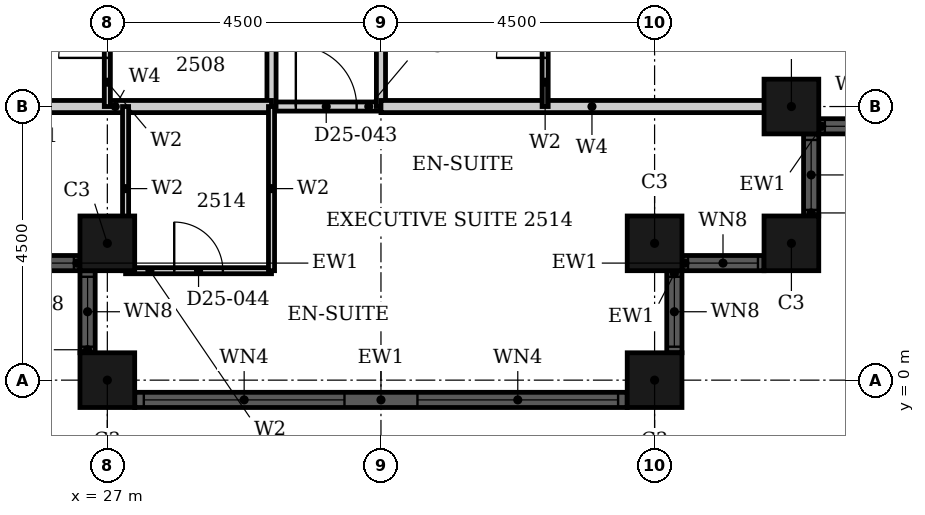
"""IFC4 building model, lengths in metres.
Left out: names, types, materials, properties, quantities, classifications, styles, units other than length and angle.
Written with IfcOpenShell. Run it as: python <this file> out.ifc"""

import sys

from ifc_helpers import new_model, si_unit, direction, frame, frame_2d, origin, origin_2d, place, context, subcontext, project, spatial, rectangle, hollow_rectangle, extrude, element, fill, save


model = new_model("IFC4")
c1 = context("Model", 3, precision=1e-05, world=origin(), true_north=direction((0.0, 1.0)))
c2 = subcontext(c1, "Body", "Model", "MODEL_VIEW")
j1 = project(units=[si_unit("LENGTHUNIT", "METRE"), si_unit("PLANEANGLEUNIT", "RADIAN")], contexts=[c1])
p1 = place(None, origin())
s1 = spatial("IfcSite", under=j1, at=p1, CompositionType="ELEMENT")
p2 = place(p1, origin())
s2 = spatial("IfcBuilding", under=s1, at=p2, CompositionType="ELEMENT")
p3 = place(p2, frame((0.0, 0.0, 104.4)))
s3 = spatial("IfcBuildingStorey", under=s2, at=p3, CompositionType="ELEMENT", Elevation=104.4)
for number, where, z_axis, x_axis in (
    (1, (27.0, 2.25, 0.0), (0.0, 0.0, 1.0), (1.0, 0.0, 0.0)),
    (2, (27.0, 0.0, 0.0), (0.0, 0.0, 1.0), (1.0, 0.0, 0.0)),
    (3, (36.0, 0.0, 0.0), (0.0, 0.0, 1.0), (1.0, 0.0, 0.0)),
    (4, (36.0, 2.25, 0.0), (0.0, 0.0, 1.0), (1.0, 0.0, 0.0)),
    (5, (38.25, 2.25, 0.0), (0.0, 0.0, 1.0), (1.0, 0.0, 0.0)),
    (6, (38.25, 4.5, 0.0), (0.0, 0.0, 1.0), (1.0, 0.0, 0.0)),
):
    element("IfcColumn", number, at=place(p3, frame(where, z_axis=z_axis, x_axis=x_axis)), inside=s3, PredefinedType="COLUMN", context=c2, shape_type="SweptSolid", body=[
        extrude(hollow_rectangle(XDim=0.9, YDim=0.9, WallThickness=0.028, at=origin_2d()), origin(), (0.0, 0.0, 1.0), 3.6),
    ])
p4 = place(p3, frame((25.2, 1.925, 0.0), z_axis=(0.0, 0.0, 1.0), x_axis=(1.0, 0.0, 0.0)))
e7 = element("IfcWall", 7, at=p4, inside=s3, PredefinedType="SOLIDWALL", context=c2, shape_type="SweptSolid", body=[
    extrude(rectangle(XDim=1.35, YDim=0.25, at=frame_2d((0.675, 0.0))), origin(), (0.0, 0.0, 1.0), 3.6),
])
p5 = place(p4, frame((0.1, 0.0, 0.9)))
e8 = element("IfcOpeningElement", 8, at=p5, cuts=e7, PredefinedType="OPENING", context=c2, shape_type="SweptSolid", body=[
    extrude(rectangle(XDim=1.15, YDim=2.08, at=frame_2d((0.575, 1.04))), frame((0.0, 0.135, 0.0), z_axis=(0.0, -1.0, 0.0), x_axis=(1.0, 0.0, 0.0)), (0.0, 0.0, 1.0), 0.27),
])
p6 = place(p3, frame((26.675, 1.8, 0.0), z_axis=(0.0, 0.0, 1.0), x_axis=(0.0, -1.0, 0.0)))
e9 = element("IfcWall", 9, at=p6, inside=s3, PredefinedType="SOLIDWALL", context=c2, shape_type="SweptSolid", body=[
    extrude(rectangle(XDim=1.35, YDim=0.25, at=frame_2d((0.675, 0.0))), origin(), (0.0, 0.0, 1.0), 3.6),
])
p7 = place(p6, frame((0.1, 0.0, 0.9)))
e10 = element("IfcOpeningElement", 10, at=p7, cuts=e9, PredefinedType="OPENING", context=c2, shape_type="SweptSolid", body=[
    extrude(rectangle(XDim=1.15, YDim=2.08, at=frame_2d((0.575, 1.04))), frame((0.0, 0.135, 0.0), z_axis=(0.0, -1.0, 0.0), x_axis=(1.0, 0.0, 0.0)), (0.0, 0.0, 1.0), 0.27),
])
p8 = place(p3, frame((27.45, -0.325, 0.0), z_axis=(0.0, 0.0, 1.0), x_axis=(1.0, 0.0, 0.0)))
e11 = element("IfcWall", 11, at=p8, inside=s3, PredefinedType="SOLIDWALL", context=c2, shape_type="SweptSolid", body=[
    extrude(rectangle(XDim=8.1, YDim=0.25, at=frame_2d((4.05, 0.0))), origin(), (0.0, 0.0, 1.0), 3.6),
])
p9 = place(p8, frame((0.15, 0.0, 0.9)))
e12 = element("IfcOpeningElement", 12, at=p9, cuts=e11, PredefinedType="OPENING", context=c2, shape_type="SweptSolid", body=[
    extrude(rectangle(XDim=3.3, YDim=2.08, at=frame_2d((1.65, 1.04))), frame((0.0, 0.135, 0.0), z_axis=(0.0, -1.0, 0.0), x_axis=(1.0, 0.0, 0.0)), (0.0, 0.0, 1.0), 0.27),
])
p10 = place(p8, frame((4.65, 0.0, 0.9)))
e13 = element("IfcOpeningElement", 13, at=p10, cuts=e11, PredefinedType="OPENING", context=c2, shape_type="SweptSolid", body=[
    extrude(rectangle(XDim=3.3, YDim=2.08, at=frame_2d((1.65, 1.04))), frame((0.0, 0.135, 0.0), z_axis=(0.0, -1.0, 0.0), x_axis=(1.0, 0.0, 0.0)), (0.0, 0.0, 1.0), 0.27),
])
p11 = place(p3, frame((36.325, 0.45, 0.0), z_axis=(0.0, 0.0, 1.0), x_axis=(0.0, 1.0, 0.0)))
e14 = element("IfcWall", 14, at=p11, inside=s3, PredefinedType="SOLIDWALL", context=c2, shape_type="SweptSolid", body=[
    extrude(rectangle(XDim=1.35, YDim=0.25, at=frame_2d((0.675, 0.0))), origin(), (0.0, 0.0, 1.0), 3.6),
])
p12 = place(p11, frame((0.1, 0.0, 0.9)))
e15 = element("IfcOpeningElement", 15, at=p12, cuts=e14, PredefinedType="OPENING", context=c2, shape_type="SweptSolid", body=[
    extrude(rectangle(XDim=1.15, YDim=2.08, at=frame_2d((0.575, 1.04))), frame((0.0, 0.135, 0.0), z_axis=(0.0, -1.0, 0.0), x_axis=(1.0, 0.0, 0.0)), (0.0, 0.0, 1.0), 0.27),
])
p13 = place(p3, frame((36.45, 1.925, 0.0), z_axis=(0.0, 0.0, 1.0), x_axis=(1.0, 0.0, 0.0)))
e16 = element("IfcWall", 16, at=p13, inside=s3, PredefinedType="SOLIDWALL", context=c2, shape_type="SweptSolid", body=[
    extrude(rectangle(XDim=1.35, YDim=0.25, at=frame_2d((0.675, 0.0))), origin(), (0.0, 0.0, 1.0), 3.6),
])
p14 = place(p13, frame((0.1, 0.0, 0.9)))
e17 = element("IfcOpeningElement", 17, at=p14, cuts=e16, PredefinedType="OPENING", context=c2, shape_type="SweptSolid", body=[
    extrude(rectangle(XDim=1.15, YDim=2.08, at=frame_2d((0.575, 1.04))), frame((0.0, 0.135, 0.0), z_axis=(0.0, -1.0, 0.0), x_axis=(1.0, 0.0, 0.0)), (0.0, 0.0, 1.0), 0.27),
])
p15 = place(p3, frame((38.575, 2.7, 0.0), z_axis=(0.0, 0.0, 1.0), x_axis=(0.0, 1.0, 0.0)))
e18 = element("IfcWall", 18, at=p15, inside=s3, PredefinedType="SOLIDWALL", context=c2, shape_type="SweptSolid", body=[
    extrude(rectangle(XDim=1.35, YDim=0.25, at=frame_2d((0.675, 0.0))), origin(), (0.0, 0.0, 1.0), 3.6),
])
p16 = place(p15, frame((0.1, 0.0, 0.9)))
e19 = element("IfcOpeningElement", 19, at=p16, cuts=e18, PredefinedType="OPENING", context=c2, shape_type="SweptSolid", body=[
    extrude(rectangle(XDim=1.15, YDim=2.08, at=frame_2d((0.575, 1.04))), frame((0.0, 0.135, 0.0), z_axis=(0.0, -1.0, 0.0), x_axis=(1.0, 0.0, 0.0)), (0.0, 0.0, 1.0), 0.27),
])
p17 = place(p3, frame((38.7, 4.175, 0.0), z_axis=(0.0, 0.0, 1.0), x_axis=(1.0, 0.0, 0.0)))
e20 = element("IfcWall", 20, at=p17, inside=s3, PredefinedType="SOLIDWALL", context=c2, shape_type="SweptSolid", body=[
    extrude(rectangle(XDim=1.35, YDim=0.25, at=frame_2d((0.675, 0.0))), origin(), (0.0, 0.0, 1.0), 3.6),
])
p18 = place(p17, frame((0.1, 0.0, 0.9)))
e21 = element("IfcOpeningElement", 21, at=p18, cuts=e20, PredefinedType="OPENING", context=c2, shape_type="SweptSolid", body=[
    extrude(rectangle(XDim=1.15, YDim=2.08, at=frame_2d((0.575, 1.04))), frame((0.0, 0.135, 0.0), z_axis=(0.0, -1.0, 0.0), x_axis=(1.0, 0.0, 0.0)), (0.0, 0.0, 1.0), 0.27),
])
p19 = place(p3, frame((29.7, 4.5, 0.0), z_axis=(0.0, 0.0, 1.0), x_axis=(1.0, 0.0, 0.0)))
e22 = element("IfcWall", 22, at=p19, inside=s3, PredefinedType="PARTITIONING", context=c2, shape_type="SweptSolid", body=[
    extrude(rectangle(XDim=1.8, YDim=0.15, at=frame_2d((0.9, 0.0))), origin(), (0.0, 0.0, 1.0), 3.3),
])
p20 = place(p19, frame((0.4, 0.0, 0.0)))
e23 = element("IfcOpeningElement", 23, at=p20, cuts=e22, PredefinedType="OPENING", context=c2, shape_type="SweptSolid", body=[
    extrude(rectangle(XDim=1.0, YDim=2.1, at=frame_2d((0.5, 1.05))), frame((0.0, 0.085, 0.0), z_axis=(0.0, -1.0, 0.0), x_axis=(1.0, 0.0, 0.0)), (0.0, 0.0, 1.0), 0.17),
])
p21 = place(p3, frame((29.7, 4.5, 0.0), z_axis=(0.0, 0.0, 1.0), x_axis=(0.0, 1.0, 0.0)))
e24 = element("IfcWall", 24, at=p21, inside=s3, PredefinedType="PARTITIONING", context=c2, shape_type="SweptSolid", body=[
    extrude(rectangle(XDim=16.2, YDim=0.15, at=frame_2d((8.1, 0.0))), origin(), (0.0, 0.0, 1.0), 3.3),
])
p22 = place(p21, frame((6.25, 0.0, 0.0)))
e25 = element("IfcOpeningElement", 25, at=p22, cuts=e24, PredefinedType="OPENING", context=c2, shape_type="SweptSolid", body=[
    extrude(rectangle(XDim=1.0, YDim=2.1, at=frame_2d((0.5, 1.05))), frame((0.0, 0.085, 0.0), z_axis=(0.0, -1.0, 0.0), x_axis=(1.0, 0.0, 0.0)), (0.0, 0.0, 1.0), 0.17),
])
p23 = place(p3, frame((31.5, 4.5, 0.0), z_axis=(0.0, 0.0, 1.0), x_axis=(0.0, 1.0, 0.0)))
e26 = element("IfcWall", 26, at=p23, inside=s3, PredefinedType="PARTITIONING", context=c2, shape_type="SweptSolid", body=[
    extrude(rectangle(XDim=16.2, YDim=0.15, at=frame_2d((8.1, 0.0))), origin(), (0.0, 0.0, 1.0), 2.58),
])
p24 = place(p23, frame((7.45, 0.0, 0.0)))
e27 = element("IfcOpeningElement", 27, at=p24, cuts=e26, PredefinedType="OPENING", context=c2, shape_type="SweptSolid", body=[
    extrude(rectangle(XDim=1.0, YDim=2.1, at=frame_2d((0.5, 1.05))), frame((0.0, 0.085, 0.0), z_axis=(0.0, -1.0, 0.0), x_axis=(1.0, 0.0, 0.0)), (0.0, 0.0, 1.0), 0.17),
])
p25 = place(p23, frame((2.95, 0.0, 0.0)))
e28 = element("IfcOpeningElement", 28, at=p25, cuts=e26, PredefinedType="OPENING", context=c2, shape_type="SweptSolid", body=[
    extrude(rectangle(XDim=1.0, YDim=2.1, at=frame_2d((0.5, 1.05))), frame((0.0, 0.085, 0.0), z_axis=(0.0, -1.0, 0.0), x_axis=(1.0, 0.0, 0.0)), (0.0, 0.0, 1.0), 0.17),
])
p26 = place(p3, frame((31.5, 4.5, 0.0), z_axis=(0.0, 0.0, 1.0), x_axis=(1.0, 0.0, 0.0)))
e29 = element("IfcWall", 29, at=p26, inside=s3, PredefinedType="PARTITIONING", context=c2, shape_type="SweptSolid", body=[
    extrude(rectangle(XDim=6.94, YDim=0.2, at=frame_2d((3.47, 0.0))), origin(), (0.0, 0.0, 1.0), 3.3),
])
p27 = place(p3, frame((24.56, 4.5, 0.0), z_axis=(0.0, 0.0, 1.0), x_axis=(1.0, 0.0, 0.0)))
e30 = element("IfcWall", 30, at=p27, inside=s3, PredefinedType="PARTITIONING", context=c2, shape_type="SweptSolid", body=[
    extrude(rectangle(XDim=5.14, YDim=0.2, at=frame_2d((2.57, 0.0))), origin(), (0.0, 0.0, 1.0), 3.3),
])
p28 = place(p3, frame((27.3, 1.8, 0.0), z_axis=(0.0, 0.0, 1.0), x_axis=(1.0, 0.0, 0.0)))
e31 = element("IfcWall", 31, at=p28, inside=s3, PredefinedType="PARTITIONING", context=c2, shape_type="SweptSolid", body=[
    extrude(rectangle(XDim=2.4, YDim=0.1, at=frame_2d((1.2, 0.0))), origin(), (0.0, 0.0, 1.0), 3.3),
])
p29 = place(p28, frame((0.8, 0.0, 0.0)))
e32 = element("IfcOpeningElement", 32, at=p29, cuts=e31, PredefinedType="OPENING", context=c2, shape_type="SweptSolid", body=[
    extrude(rectangle(XDim=0.8, YDim=2.1, at=frame_2d((0.4, 1.05))), frame((0.0, 0.06, 0.0), z_axis=(0.0, -1.0, 0.0), x_axis=(1.0, 0.0, 0.0)), (0.0, 0.0, 1.0), 0.12),
])
p30 = place(p3, frame((27.0, 4.5, 0.0), z_axis=(0.0, 0.0, 1.0), x_axis=(0.0, 1.0, 0.0)))
e33 = element("IfcWall", 33, at=p30, inside=s3, PredefinedType="PARTITIONING", context=c2, shape_type="SweptSolid", body=[
    extrude(rectangle(XDim=2.4, YDim=0.1, at=frame_2d((1.2, 0.0))), origin(), (0.0, 0.0, 1.0), 2.58),
])
p31 = place(p30, frame((0.8, 0.0, 0.0)))
e34 = element("IfcOpeningElement", 34, at=p31, cuts=e33, PredefinedType="OPENING", context=c2, shape_type="SweptSolid", body=[
    extrude(rectangle(XDim=0.8, YDim=2.1, at=frame_2d((0.4, 1.05))), frame((0.0, 0.06, 0.0), z_axis=(0.0, -1.0, 0.0), x_axis=(1.0, 0.0, 0.0)), (0.0, 0.0, 1.0), 0.12),
])
for number, where, z_axis, x_axis in (
    (35, (27.3, 1.8, 0.0), (0.0, 0.0, 1.0), (0.0, 1.0, 0.0)),
    (36, (29.7, 1.8, 0.0), (0.0, 0.0, 1.0), (0.0, 1.0, 0.0)),
):
    element("IfcWall", number, at=place(p3, frame(where, z_axis=z_axis, x_axis=x_axis)), inside=s3, PredefinedType="PARTITIONING", context=c2, shape_type="SweptSolid", body=[
        extrude(rectangle(XDim=2.7, YDim=0.1, at=frame_2d((1.35, 0.0))), origin(), (0.0, 0.0, 1.0), 3.3),
    ])
p32 = place(p3, frame((34.2, 4.5, 0.0), z_axis=(0.0, 0.0, 1.0), x_axis=(0.0, 1.0, 0.0)))
e37 = element("IfcWall", 37, at=p32, inside=s3, PredefinedType="PARTITIONING", context=c2, shape_type="SweptSolid", body=[
    extrude(rectangle(XDim=2.4, YDim=0.1, at=frame_2d((1.2, 0.0))), origin(), (0.0, 0.0, 1.0), 3.3),
])
p33 = place(p32, frame((0.8, 0.0, 0.0)))
e38 = element("IfcOpeningElement", 38, at=p33, cuts=e37, PredefinedType="OPENING", context=c2, shape_type="SweptSolid", body=[
    extrude(rectangle(XDim=0.8, YDim=2.1, at=frame_2d((0.4, 1.05))), frame((0.0, 0.06, 0.0), z_axis=(0.0, -1.0, 0.0), x_axis=(1.0, 0.0, 0.0)), (0.0, 0.0, 1.0), 0.12),
])
p34 = place(p5, origin())
e39 = element("IfcWindow", 39, at=p34, inside=s3, PartitioningType="SINGLE_PANEL", PredefinedType="WINDOW", context=c2, shape_type="SweptSolid", body=[
    extrude(rectangle(XDim=1.15, YDim=2.08, at=frame_2d((0.575, 1.04))), frame((0.0, 0.03, 0.0), z_axis=(0.0, -1.0, 0.0), x_axis=(1.0, 0.0, 0.0)), (0.0, 0.0, 1.0), 0.06),
])
fill(e8, e39)
p35 = place(p7, origin())
e40 = element("IfcWindow", 40, at=p35, inside=s3, PartitioningType="SINGLE_PANEL", PredefinedType="WINDOW", context=c2, shape_type="SweptSolid", body=[
    extrude(rectangle(XDim=1.15, YDim=2.08, at=frame_2d((0.575, 1.04))), frame((0.0, 0.03, 0.0), z_axis=(0.0, -1.0, 0.0), x_axis=(1.0, 0.0, 0.0)), (0.0, 0.0, 1.0), 0.06),
])
fill(e10, e40)
p36 = place(p9, origin())
e41 = element("IfcWindow", 41, at=p36, inside=s3, PartitioningType="SINGLE_PANEL", PredefinedType="WINDOW", context=c2, shape_type="SweptSolid", body=[
    extrude(rectangle(XDim=3.3, YDim=2.08, at=frame_2d((1.65, 1.04))), frame((0.0, 0.03, 0.0), z_axis=(0.0, -1.0, 0.0), x_axis=(1.0, 0.0, 0.0)), (0.0, 0.0, 1.0), 0.06),
])
fill(e12, e41)
p37 = place(p10, origin())
e42 = element("IfcWindow", 42, at=p37, inside=s3, PartitioningType="SINGLE_PANEL", PredefinedType="WINDOW", context=c2, shape_type="SweptSolid", body=[
    extrude(rectangle(XDim=3.3, YDim=2.08, at=frame_2d((1.65, 1.04))), frame((0.0, 0.03, 0.0), z_axis=(0.0, -1.0, 0.0), x_axis=(1.0, 0.0, 0.0)), (0.0, 0.0, 1.0), 0.06),
])
fill(e13, e42)
p38 = place(p12, origin())
e43 = element("IfcWindow", 43, at=p38, inside=s3, PartitioningType="SINGLE_PANEL", PredefinedType="WINDOW", context=c2, shape_type="SweptSolid", body=[
    extrude(rectangle(XDim=1.15, YDim=2.08, at=frame_2d((0.575, 1.04))), frame((0.0, 0.03, 0.0), z_axis=(0.0, -1.0, 0.0), x_axis=(1.0, 0.0, 0.0)), (0.0, 0.0, 1.0), 0.06),
])
fill(e15, e43)
p39 = place(p14, origin())
e44 = element("IfcWindow", 44, at=p39, inside=s3, PartitioningType="SINGLE_PANEL", PredefinedType="WINDOW", context=c2, shape_type="SweptSolid", body=[
    extrude(rectangle(XDim=1.15, YDim=2.08, at=frame_2d((0.575, 1.04))), frame((0.0, 0.03, 0.0), z_axis=(0.0, -1.0, 0.0), x_axis=(1.0, 0.0, 0.0)), (0.0, 0.0, 1.0), 0.06),
])
fill(e17, e44)
p40 = place(p16, origin())
e45 = element("IfcWindow", 45, at=p40, inside=s3, PartitioningType="SINGLE_PANEL", PredefinedType="WINDOW", context=c2, shape_type="SweptSolid", body=[
    extrude(rectangle(XDim=1.15, YDim=2.08, at=frame_2d((0.575, 1.04))), frame((0.0, 0.03, 0.0), z_axis=(0.0, -1.0, 0.0), x_axis=(1.0, 0.0, 0.0)), (0.0, 0.0, 1.0), 0.06),
])
fill(e19, e45)
p41 = place(p18, origin())
e46 = element("IfcWindow", 46, at=p41, inside=s3, PartitioningType="SINGLE_PANEL", PredefinedType="WINDOW", context=c2, shape_type="SweptSolid", body=[
    extrude(rectangle(XDim=1.15, YDim=2.08, at=frame_2d((0.575, 1.04))), frame((0.0, 0.03, 0.0), z_axis=(0.0, -1.0, 0.0), x_axis=(1.0, 0.0, 0.0)), (0.0, 0.0, 1.0), 0.06),
])
fill(e21, e46)
p42 = place(p31, origin())
e47 = element("IfcDoor", 47, at=p42, inside=s3, OperationType="SINGLE_SWING_RIGHT", PredefinedType="DOOR", context=c2, shape_type="SweptSolid", body=[
    extrude(rectangle(XDim=0.8, YDim=2.1, at=frame_2d((0.4, 1.05))), frame((0.0, 0.025, 0.0), z_axis=(0.0, -1.0, 0.0), x_axis=(1.0, 0.0, 0.0)), (0.0, 0.0, 1.0), 0.05),
])
fill(e34, e47)
p43 = place(p33, origin())
e48 = element("IfcDoor", 48, at=p43, inside=s3, OperationType="SINGLE_SWING_RIGHT", PredefinedType="DOOR", context=c2, shape_type="SweptSolid", body=[
    extrude(rectangle(XDim=0.8, YDim=2.1, at=frame_2d((0.4, 1.05))), frame((0.0, 0.025, 0.0), z_axis=(0.0, -1.0, 0.0), x_axis=(1.0, 0.0, 0.0)), (0.0, 0.0, 1.0), 0.05),
])
fill(e38, e48)
p44 = place(p20, origin())
e49 = element("IfcDoor", 49, at=p44, inside=s3, OperationType="SINGLE_SWING_LEFT", PredefinedType="DOOR", context=c2, shape_type="SweptSolid", body=[
    extrude(rectangle(XDim=1.0, YDim=2.1, at=frame_2d((0.5, 1.05))), frame((0.0, 0.025, 0.0), z_axis=(0.0, -1.0, 0.0), x_axis=(1.0, 0.0, 0.0)), (0.0, 0.0, 1.0), 0.05),
])
fill(e23, e49)
p45 = place(p29, origin())
e50 = element("IfcDoor", 50, at=p45, inside=s3, OperationType="SINGLE_SWING_LEFT", PredefinedType="DOOR", context=c2, shape_type="SweptSolid", body=[
    extrude(rectangle(XDim=0.8, YDim=2.1, at=frame_2d((0.4, 1.05))), frame((0.0, 0.025, 0.0), z_axis=(0.0, -1.0, 0.0), x_axis=(1.0, 0.0, 0.0)), (0.0, 0.0, 1.0), 0.05),
])
fill(e32, e50)
save(model, sys.argv[1])
